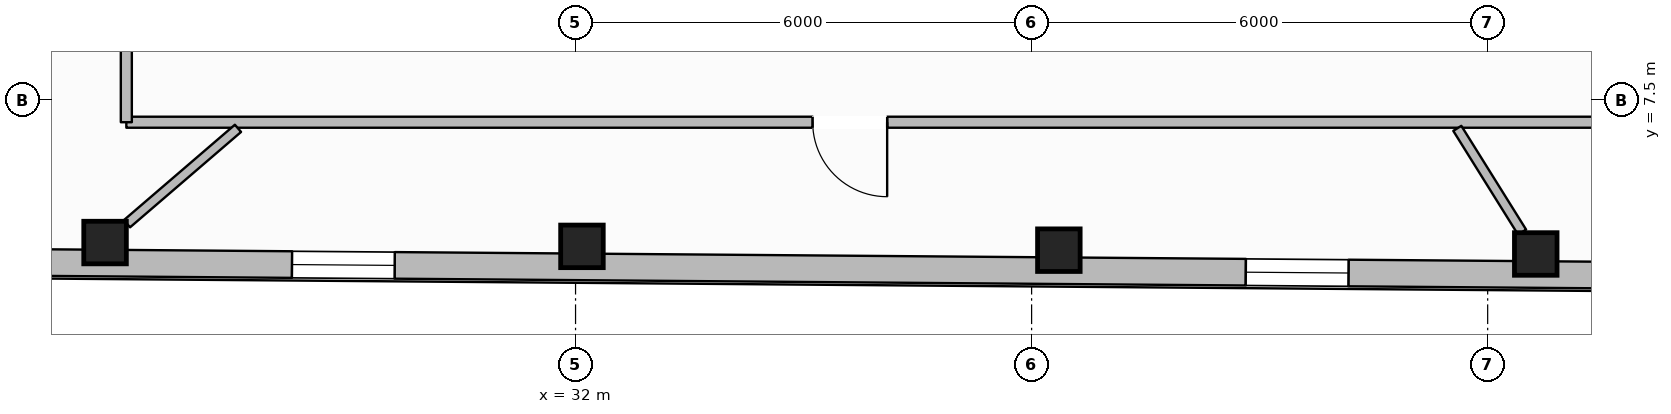
"""IFC4 building model, lengths in metres.
Left out: names, types, materials, properties, quantities, classifications, styles, units other than length and angle.
Written with IfcOpenShell. Run it as: python <this file> out.ifc"""

import sys

from ifc_helpers import new_model, si_unit, direction, frame, frame_2d, origin, origin_2d, place, context, subcontext, project, spatial, rectangle, hollow_rectangle, extrude, element, fill, save


model = new_model("IFC4")
c1 = context("Model", 3, precision=1e-05, world=origin(), true_north=direction((0.0, 1.0)))
c2 = subcontext(c1, "Body", "Model", "MODEL_VIEW")
j1 = project(units=[si_unit("LENGTHUNIT", "METRE"), si_unit("PLANEANGLEUNIT", "RADIAN")], contexts=[c1])
p1 = place(None, origin())
s1 = spatial("IfcSite", under=j1, at=p1, CompositionType="ELEMENT")
p2 = place(p1, origin())
s2 = spatial("IfcBuilding", under=s1, at=p2, CompositionType="ELEMENT")
p3 = place(p2, frame((0.0, 0.0, 266.45)))
s3 = spatial("IfcBuildingStorey", under=s2, at=p3, CompositionType="ELEMENT", Elevation=266.45)
for number, where, z_axis, x_axis in (
    (1, (25.81, 5.627, 0.0), (0.0, 0.0, 1.0), (1.0, 0.0, 0.0)),
    (2, (32.084, 5.577, 0.0), (0.0, 0.0, 1.0), (1.0, 0.0, 0.0)),
    (3, (38.358, 5.527, 0.0), (0.0, 0.0, 1.0), (1.0, 0.0, 0.0)),
    (4, (44.633, 5.477, 0.0), (0.0, 0.0, 1.0), (1.0, 0.0, 0.0)),
):
    element("IfcColumn", number, at=place(p3, frame(where, z_axis=z_axis, x_axis=x_axis)), inside=s3, PredefinedType="COLUMN", context=c2, shape_type="SweptSolid", body=[
        extrude(hollow_rectangle(XDim=0.56, YDim=0.56, WallThickness=0.025, at=origin_2d()), origin(), (0.0, 0.0, 1.0), 3.61),
    ])
p4 = place(p3, frame((57.657, 5.103, 0.0), z_axis=(0.0, 0.0, 1.0), x_axis=(-0.999968086085, 0.007989168371, 0.0)))
e5 = element("IfcWall", 5, at=p4, inside=s3, PredefinedType="STANDARD", context=c2, shape_type="SweptSolid", body=[
    extrude(rectangle(XDim=38.596, YDim=0.35, at=frame_2d((19.298, 0.0))), origin(), (0.0, 0.0, 1.0), 3.196),
])
p5 = place(p4, frame((34.313, 0.0, 0.65)))
e6 = element("IfcOpeningElement", 6, at=p5, cuts=e5, PredefinedType="OPENING", context=c2, shape_type="SweptSolid", body=[
    extrude(rectangle(XDim=1.35, YDim=1.75, at=frame_2d((0.675, 0.875))), frame((0.0, 0.185, 0.0), z_axis=(0.0, -1.0, 0.0), x_axis=(1.0, 0.0, 0.0)), (0.0, 0.0, 1.0), 0.37),
])
p6 = place(p4, frame((28.038, 0.0, 0.65)))
e7 = element("IfcOpeningElement", 7, at=p6, cuts=e5, PredefinedType="OPENING", context=c2, shape_type="SweptSolid", body=[
    extrude(rectangle(XDim=1.35, YDim=1.75, at=frame_2d((0.675, 0.875))), frame((0.0, 0.185, 0.0), z_axis=(0.0, -1.0, 0.0), x_axis=(1.0, 0.0, 0.0)), (0.0, 0.0, 1.0), 0.37),
])
p7 = place(p4, frame((15.49, 0.0, 0.65)))
e8 = element("IfcOpeningElement", 8, at=p7, cuts=e5, PredefinedType="OPENING", context=c2, shape_type="SweptSolid", body=[
    extrude(rectangle(XDim=1.35, YDim=1.75, at=frame_2d((0.675, 0.875))), frame((0.0, 0.185, 0.0), z_axis=(0.0, -1.0, 0.0), x_axis=(1.0, 0.0, 0.0)), (0.0, 0.0, 1.0), 0.37),
])
p8 = place(p4, frame((9.215, 0.0, 0.65)))
e9 = element("IfcOpeningElement", 9, at=p8, cuts=e5, PredefinedType="OPENING", context=c2, shape_type="SweptSolid", body=[
    extrude(rectangle(XDim=1.35, YDim=1.75, at=frame_2d((0.675, 0.875))), frame((0.0, 0.185, 0.0), z_axis=(0.0, -1.0, 0.0), x_axis=(1.0, 0.0, 0.0)), (0.0, 0.0, 1.0), 0.37),
])
p9 = place(p4, frame((2.941, 0.0, 0.65)))
e10 = element("IfcOpeningElement", 10, at=p9, cuts=e5, PredefinedType="OPENING", context=c2, shape_type="SweptSolid", body=[
    extrude(rectangle(XDim=1.35, YDim=1.75, at=frame_2d((0.675, 0.875))), frame((0.0, 0.185, 0.0), z_axis=(0.0, -1.0, 0.0), x_axis=(1.0, 0.0, 0.0)), (0.0, 0.0, 1.0), 0.37),
])
p10 = place(p3, frame((49.91, 7.21, 0.0), z_axis=(0.0, 0.0, 1.0), x_axis=(-1.0, 0.0, 0.0)))
e11 = element("IfcWall", 11, at=p10, inside=s3, PredefinedType="PARTITIONING", context=c2, shape_type="SweptSolid", body=[
    extrude(rectangle(XDim=23.82, YDim=0.145, at=frame_2d((11.91, 0.0))), origin(), (0.0, 0.0, 1.0), 3.61),
])
p11 = place(p10, frame((13.81, 0.0, 0.0)))
e12 = element("IfcOpeningElement", 12, at=p11, cuts=e11, PredefinedType="OPENING", context=c2, shape_type="SweptSolid", body=[
    extrude(rectangle(XDim=0.98, YDim=2.15, at=frame_2d((0.49, 1.075))), frame((0.0, 0.083, 0.0), z_axis=(0.0, -1.0, 0.0), x_axis=(1.0, 0.0, 0.0)), (0.0, 0.0, 1.0), 0.165),
])
p12 = place(p10, frame((2.337, 0.0, 0.0)))
e13 = element("IfcOpeningElement", 13, at=p12, cuts=e11, PredefinedType="OPENING", context=c2, shape_type="SweptSolid", body=[
    extrude(rectangle(XDim=1.4, YDim=2.2, at=frame_2d((0.7, 1.1))), frame((0.0, 0.083, 0.0), z_axis=(0.0, -1.0, 0.0), x_axis=(1.0, 0.0, 0.0)), (0.0, 0.0, 1.0), 0.165),
])
p13 = place(p3, frame((26.09, 7.21, 0.0), z_axis=(0.0, 0.0, 1.0), x_axis=(0.0, 1.0, 0.0)))
e14 = element("IfcWall", 14, at=p13, inside=s3, PredefinedType="PARTITIONING", context=c2, shape_type="SweptSolid", body=[
    extrude(rectangle(XDim=17.78, YDim=0.145, at=frame_2d((8.89, 0.0))), origin(), (0.0, 0.0, 1.0), 3.349),
])
p14 = place(p13, frame((12.838, 0.0, 0.0)))
e15 = element("IfcOpeningElement", 15, at=p14, cuts=e14, PredefinedType="OPENING", context=c2, shape_type="SweptSolid", body=[
    extrude(rectangle(XDim=0.98, YDim=2.15, at=frame_2d((0.49, 1.075))), frame((0.0, 0.083, 0.0), z_axis=(0.0, -1.0, 0.0), x_axis=(1.0, 0.0, 0.0)), (0.0, 0.0, 1.0), 0.165),
])
p15 = place(p13, frame((3.91, 0.0, 0.0)))
e16 = element("IfcOpeningElement", 16, at=p15, cuts=e14, PredefinedType="OPENING", context=c2, shape_type="SweptSolid", body=[
    extrude(rectangle(XDim=1.4, YDim=2.2, at=frame_2d((0.7, 1.1))), frame((0.0, 0.083, 0.0), z_axis=(0.0, -1.0, 0.0), x_axis=(1.0, 0.0, 0.0)), (0.0, 0.0, 1.0), 0.165),
])
p16 = place(p3, frame((27.559, 7.129, 0.0), z_axis=(0.0, 0.0, 1.0), x_axis=(-0.758522289578, -0.65164709484, 0.0)))
e17 = element("IfcWall", 17, at=p16, inside=s3, PredefinedType="PARTITIONING", context=c2, shape_type="SweptSolid", body=[
    extrude(rectangle(XDim=1.926, YDim=0.125, at=frame_2d((0.963, 0.0))), origin(), (0.0, 0.0, 1.0), 3.61),
])
p17 = place(p3, frame((43.601, 7.129, 0.0), z_axis=(0.0, 0.0, 1.0), x_axis=(0.529698851151, -0.848185785715, 0.0)))
e18 = element("IfcWall", 18, at=p17, inside=s3, PredefinedType="PARTITIONING", context=c2, shape_type="SweptSolid", body=[
    extrude(rectangle(XDim=1.609, YDim=0.125, at=frame_2d((0.805, 0.0))), origin(), (0.0, 0.0, 1.0), 3.61),
])
p18 = place(p6, origin())
e19 = element("IfcWindow", 19, at=p18, inside=s3, PartitioningType="SINGLE_PANEL", PredefinedType="WINDOW", context=c2, shape_type="SweptSolid", body=[
    extrude(rectangle(XDim=1.35, YDim=1.75, at=frame_2d((0.675, 0.875))), frame((0.0, 0.03, 0.0), z_axis=(0.0, -1.0, 0.0), x_axis=(1.0, 0.0, 0.0)), (0.0, 0.0, 1.0), 0.06),
])
fill(e7, e19)
p19 = place(p7, origin())
e20 = element("IfcWindow", 20, at=p19, inside=s3, PartitioningType="SINGLE_PANEL", PredefinedType="WINDOW", context=c2, shape_type="SweptSolid", body=[
    extrude(rectangle(XDim=1.35, YDim=1.75, at=frame_2d((0.675, 0.875))), frame((0.0, 0.03, 0.0), z_axis=(0.0, -1.0, 0.0), x_axis=(1.0, 0.0, 0.0)), (0.0, 0.0, 1.0), 0.06),
])
fill(e8, e20)
p20 = place(p11, origin())
e21 = element("IfcDoor", 21, at=p20, inside=s3, OperationType="SINGLE_SWING_LEFT", PredefinedType="DOOR", context=c2, shape_type="SweptSolid", body=[
    extrude(rectangle(XDim=0.98, YDim=2.15, at=frame_2d((0.49, 1.075))), frame((0.0, 0.025, 0.0), z_axis=(0.0, -1.0, 0.0), x_axis=(1.0, 0.0, 0.0)), (0.0, 0.0, 1.0), 0.05),
])
fill(e12, e21)
save(model, sys.argv[1])
